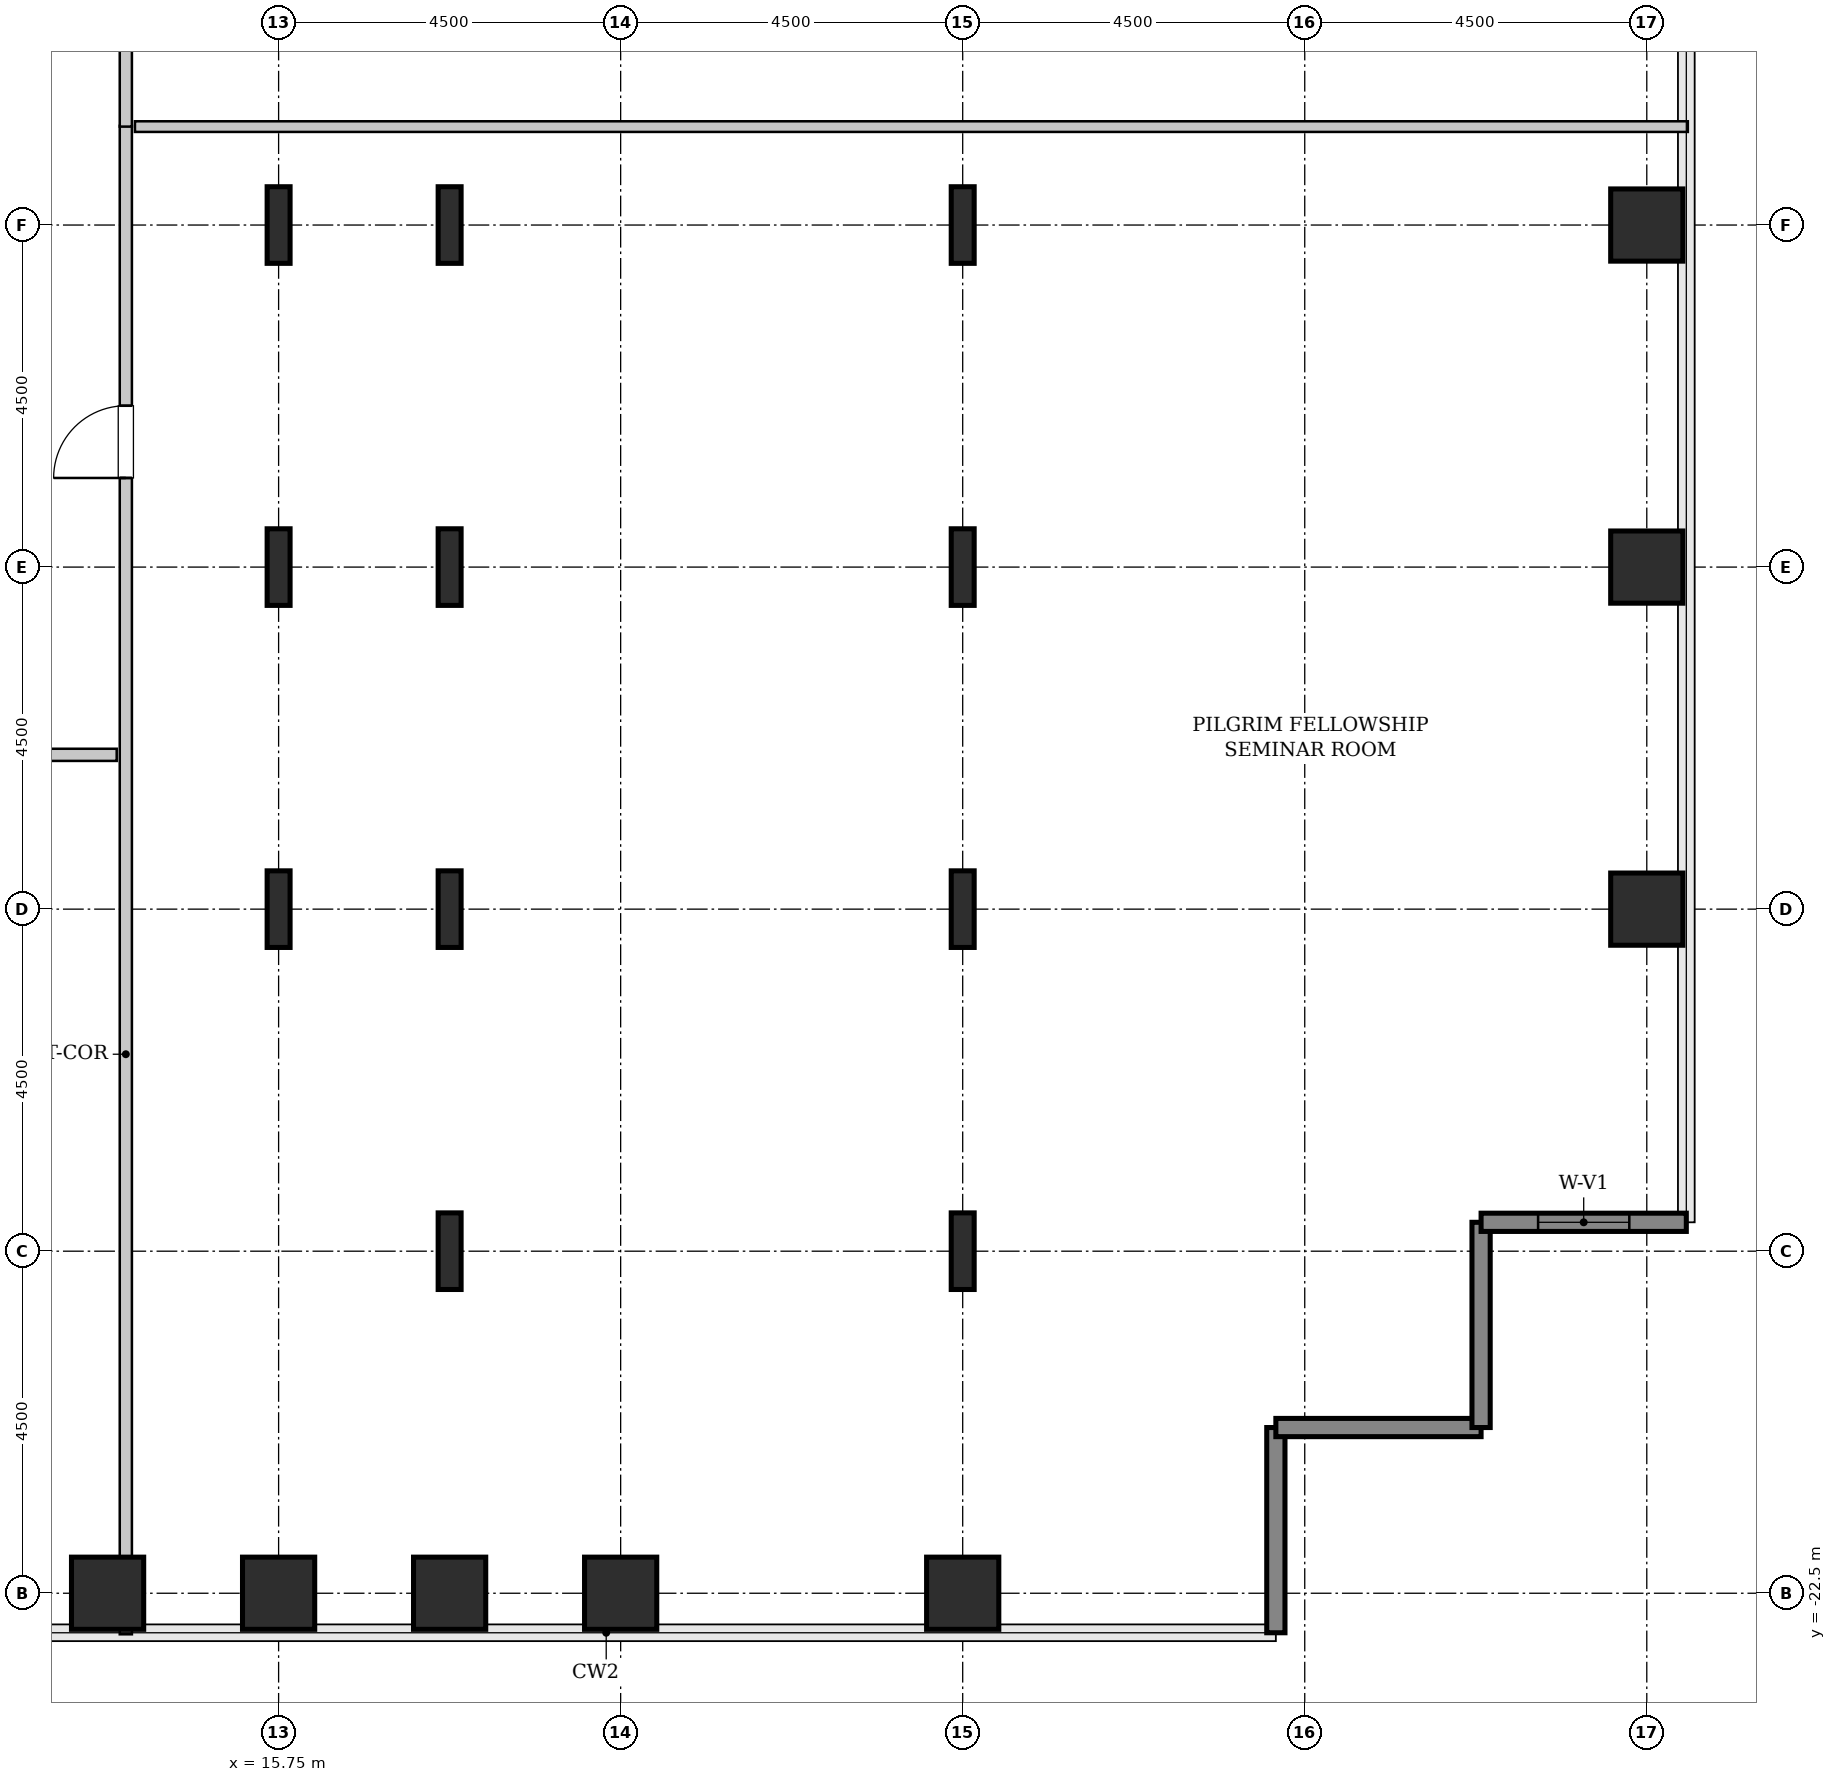
"""IFC4 building model, lengths in metres.
Left out: names, types, materials, properties, quantities, classifications, styles, units other than length and angle.
Written with IfcOpenShell. Run it as: python <this file> out.ifc"""

import sys

from ifc_helpers import new_model, si_unit, direction, frame, frame_2d, origin, origin_2d, place, context, subcontext, project, spatial, rectangle, hollow_rectangle, i_section, extrude, source, transform, mapped, element, fill, save


model = new_model("IFC4")
c1 = context("Model", 3, precision=1e-05, world=origin(), true_north=direction((0.0, 1.0)))
c2 = subcontext(c1, "Body", "Model", "MODEL_VIEW")
j1 = project(units=[si_unit("LENGTHUNIT", "METRE"), si_unit("PLANEANGLEUNIT", "RADIAN")], contexts=[c1])
p1 = place(None, origin())
s1 = spatial("IfcSite", under=j1, at=p1, CompositionType="ELEMENT")
p2 = place(p1, origin())
s2 = spatial("IfcBuilding", under=s1, at=p2, CompositionType="ELEMENT")
p3 = place(p2, frame((0.0, 0.0, 106.0)))
s3 = spatial("IfcBuildingStorey", under=s2, at=p3, CompositionType="ELEMENT", Elevation=106.0)
m1 = source(origin(), c2, "Body", "SweptSolid", [
    extrude(hollow_rectangle(XDim=0.95, YDim=0.95, WallThickness=0.045, InnerFilletRadius=0.045, OuterFilletRadius=0.09, at=origin_2d()), origin(), (0.0, 0.0, 1.0), 3.8),
])
for number, where, z_axis, x_axis in (
    (1, (13.5, -22.5, 0.0), (0.0, 0.0, 1.0), (1.0, 0.0, 0.0)),
    (2, (15.75, -22.5, 0.0), (0.0, 0.0, 1.0), (1.0, 0.0, 0.0)),
):
    element("IfcColumn", number, at=place(p3, frame(where, z_axis=z_axis, x_axis=x_axis)), inside=s3, PredefinedType="COLUMN", context=c2, shape_type="MappedRepresentation", body=[
        mapped(m1, transform((0.0, 0.0, 0.0), x_axis=(1.0, 0.0, 0.0), y_axis=(0.0, 1.0, 0.0), z_axis=(0.0, 0.0, 1.0), scale=1.0)),
    ])
m2 = source(origin(), c2, "Body", "SweptSolid", [
    extrude(i_section(OverallWidth=0.302, OverallDepth=1.008, WebThickness=0.021, FlangeThickness=0.04, FilletRadius=0.03, at=origin_2d()), origin(), (0.0, 0.0, 1.0), 3.8),
])
for number, where, z_axis, x_axis in (
    (3, (15.75, -13.5, 0.0), (0.0, 0.0, 1.0), (1.0, 0.0, 0.0)),
    (4, (15.75, -9.0, 0.0), (0.0, 0.0, 1.0), (1.0, 0.0, 0.0)),
    (5, (15.75, -4.5, 0.0), (0.0, 0.0, 1.0), (1.0, 0.0, 0.0)),
):
    element("IfcColumn", number, at=place(p3, frame(where, z_axis=z_axis, x_axis=x_axis)), inside=s3, PredefinedType="COLUMN", context=c2, shape_type="MappedRepresentation", body=[
        mapped(m2, transform((0.0, 0.0, 0.0), x_axis=(1.0, 0.0, 0.0), y_axis=(0.0, 1.0, 0.0), z_axis=(0.0, 0.0, 1.0), scale=1.0)),
    ])
p4 = place(p3, frame((18.0, -22.5, 0.0), z_axis=(0.0, 0.0, 1.0), x_axis=(1.0, 0.0, 0.0)))
e6 = element("IfcColumn", 6, at=p4, inside=s3, PredefinedType="COLUMN", context=c2, shape_type="MappedRepresentation", body=[
    mapped(m1, transform((0.0, 0.0, 0.0), x_axis=(1.0, 0.0, 0.0), y_axis=(0.0, 1.0, 0.0), z_axis=(0.0, 0.0, 1.0), scale=1.0)),
])
for number, where, z_axis, x_axis in (
    (7, (18.0, -18.0, 0.0), (0.0, 0.0, 1.0), (1.0, 0.0, 0.0)),
    (8, (18.0, -13.5, 0.0), (0.0, 0.0, 1.0), (1.0, 0.0, 0.0)),
    (9, (18.0, -9.0, 0.0), (0.0, 0.0, 1.0), (1.0, 0.0, 0.0)),
    (10, (18.0, -4.5, 0.0), (0.0, 0.0, 1.0), (1.0, 0.0, 0.0)),
):
    element("IfcColumn", number, at=place(p3, frame(where, z_axis=z_axis, x_axis=x_axis)), inside=s3, PredefinedType="COLUMN", context=c2, shape_type="MappedRepresentation", body=[
        mapped(m2, transform((0.0, 0.0, 0.0), x_axis=(1.0, 0.0, 0.0), y_axis=(0.0, 1.0, 0.0), z_axis=(0.0, 0.0, 1.0), scale=1.0)),
    ])
for number, where, z_axis, x_axis in (
    (11, (20.25, -22.5, 0.0), (0.0, 0.0, 1.0), (1.0, 0.0, 0.0)),
    (12, (24.75, -22.5, 0.0), (0.0, 0.0, 1.0), (1.0, 0.0, 0.0)),
):
    element("IfcColumn", number, at=place(p3, frame(where, z_axis=z_axis, x_axis=x_axis)), inside=s3, PredefinedType="COLUMN", context=c2, shape_type="MappedRepresentation", body=[
        mapped(m1, transform((0.0, 0.0, 0.0), x_axis=(1.0, 0.0, 0.0), y_axis=(0.0, 1.0, 0.0), z_axis=(0.0, 0.0, 1.0), scale=1.0)),
    ])
for number, where, z_axis, x_axis in (
    (13, (24.75, -18.0, 0.0), (0.0, 0.0, 1.0), (1.0, 0.0, 0.0)),
    (14, (24.75, -13.5, 0.0), (0.0, 0.0, 1.0), (1.0, 0.0, 0.0)),
    (15, (24.75, -9.0, 0.0), (0.0, 0.0, 1.0), (1.0, 0.0, 0.0)),
    (16, (24.75, -4.5, 0.0), (0.0, 0.0, 1.0), (1.0, 0.0, 0.0)),
):
    element("IfcColumn", number, at=place(p3, frame(where, z_axis=z_axis, x_axis=x_axis)), inside=s3, PredefinedType="COLUMN", context=c2, shape_type="MappedRepresentation", body=[
        mapped(m2, transform((0.0, 0.0, 0.0), x_axis=(1.0, 0.0, 0.0), y_axis=(0.0, 1.0, 0.0), z_axis=(0.0, 0.0, 1.0), scale=1.0)),
    ])
for number, where, z_axis, x_axis in (
    (17, (33.75, -13.5, 0.0), (0.0, 0.0, 1.0), (1.0, 0.0, 0.0)),
    (18, (33.75, -9.0, 0.0), (0.0, 0.0, 1.0), (1.0, 0.0, 0.0)),
    (19, (33.75, -4.5, 0.0), (0.0, 0.0, 1.0), (1.0, 0.0, 0.0)),
):
    element("IfcColumn", number, at=place(p3, frame(where, z_axis=z_axis, x_axis=x_axis)), inside=s3, PredefinedType="COLUMN", context=c2, shape_type="MappedRepresentation", body=[
        mapped(m1, transform((0.0, 0.0, 0.0), x_axis=(1.0, 0.0, 0.0), y_axis=(0.0, 1.0, 0.0), z_axis=(0.0, 0.0, 1.0), scale=1.0)),
    ])
m3 = source(origin(), c2, "Body", "SweptSolid", [
    extrude(rectangle(XDim=2.7, YDim=0.24, at=frame_2d((1.35, 0.0))), origin(), (0.0, 0.0, 1.0), 3.55),
])
for number, where, z_axis, x_axis in (
    (20, (28.87, -23.02, 0.0), (0.0, 0.0, 1.0), (0.0, 1.0, 0.0)),
    (21, (28.87, -20.32, 0.0), (0.0, 0.0, 1.0), (1.0, 0.0, 0.0)),
    (22, (31.57, -20.32, 0.0), (0.0, 0.0, 1.0), (0.0, 1.0, 0.0)),
):
    element("IfcWall", number, at=place(p3, frame(where, z_axis=z_axis, x_axis=x_axis)), inside=s3, PredefinedType="SHEAR", context=c2, shape_type="MappedRepresentation", body=[
        mapped(m3, transform((0.0, 0.0, 0.0), x_axis=(1.0, 0.0, 0.0), y_axis=(0.0, 1.0, 0.0), z_axis=(0.0, 0.0, 1.0), scale=1.0)),
    ])
p5 = place(p3, frame((31.57, -17.62, 0.0), z_axis=(0.0, 0.0, 1.0), x_axis=(1.0, 0.0, 0.0)))
e23 = element("IfcWall", 23, at=p5, inside=s3, PredefinedType="SHEAR", context=c2, shape_type="MappedRepresentation", body=[
    mapped(m3, transform((0.0, 0.0, 0.0), x_axis=(1.0, 0.0, 0.0), y_axis=(0.0, 1.0, 0.0), z_axis=(0.0, 0.0, 1.0), scale=1.0)),
])
p6 = place(p5, frame((0.75, 0.0, 0.85)))
e24 = element("IfcOpeningElement", 24, at=p6, cuts=e23, PredefinedType="OPENING", context=c2, shape_type="SweptSolid", body=[
    extrude(rectangle(XDim=1.2, YDim=1.8, at=frame_2d((0.6, 0.9))), frame((0.0, 0.13, 0.0), z_axis=(0.0, -1.0, 0.0), x_axis=(1.0, 0.0, 0.0)), (0.0, 0.0, 1.0), 0.26),
])
m4 = source(origin(), c2, "Body", "SweptSolid", [
    extrude(rectangle(XDim=19.845, YDim=0.16, at=frame_2d((9.922, 0.0))), origin(), (0.0, 0.0, 1.0), 3.535),
])
p7 = place(p3, frame((13.74, -23.04, 0.0), z_axis=(0.0, 0.0, 1.0), x_axis=(0.0, 1.0, 0.0)))
e25 = element("IfcWall", 25, at=p7, inside=s3, PredefinedType="PARTITIONING", context=c2, shape_type="MappedRepresentation", body=[
    mapped(m4, transform((0.0, 0.0, 0.0), x_axis=(1.0, 0.0, 0.0), y_axis=(0.0, 1.0, 0.0), z_axis=(0.0, 0.0, 1.0), scale=1.0)),
])
p8 = place(p7, frame((15.212, 0.0, 0.0)))
e26 = element("IfcOpeningElement", 26, at=p8, cuts=e25, PredefinedType="OPENING", context=c2, shape_type="SweptSolid", body=[
    extrude(rectangle(XDim=0.95, YDim=2.1, at=frame_2d((0.475, 1.05))), frame((0.0, 0.09, 0.0), z_axis=(0.0, -1.0, 0.0), x_axis=(1.0, 0.0, 0.0)), (0.0, 0.0, 1.0), 0.18),
])
m5 = source(origin(), c2, "Body", "SweptSolid", [
    extrude(rectangle(XDim=20.43, YDim=0.14, at=frame_2d((10.215, 0.0))), origin(), (0.0, 0.0, 1.0), 3.535),
])
p9 = place(p3, frame((13.86, -3.205, 0.0), z_axis=(0.0, 0.0, 1.0), x_axis=(1.0, 0.0, 0.0)))
e27 = element("IfcWall", 27, at=p9, inside=s3, PredefinedType="PARTITIONING", context=c2, shape_type="MappedRepresentation", body=[
    mapped(m5, transform((0.0, 0.0, 0.0), x_axis=(1.0, 0.0, 0.0), y_axis=(0.0, 1.0, 0.0), z_axis=(0.0, 0.0, 1.0), scale=1.0)),
])
m6 = source(origin(), c2, "Body", "SweptSolid", [
    extrude(rectangle(XDim=6.81, YDim=0.16, at=frame_2d((3.405, 0.0))), origin(), (0.0, 0.0, 1.0), 3.535),
])
p10 = place(p3, frame((13.74, -3.205, 0.0), z_axis=(0.0, 0.0, 1.0), x_axis=(0.0, 1.0, 0.0)))
e28 = element("IfcWall", 28, at=p10, inside=s3, PredefinedType="PARTITIONING", context=c2, shape_type="MappedRepresentation", body=[
    mapped(m6, transform((0.0, 0.0, 0.0), x_axis=(1.0, 0.0, 0.0), y_axis=(0.0, 1.0, 0.0), z_axis=(0.0, 0.0, 1.0), scale=1.0)),
])
p11 = place(p10, frame((2.93, 0.0, 0.0)))
e29 = element("IfcOpeningElement", 29, at=p11, cuts=e28, PredefinedType="OPENING", context=c2, shape_type="SweptSolid", body=[
    extrude(rectangle(XDim=0.95, YDim=2.1, at=frame_2d((0.475, 1.05))), frame((0.0, 0.09, 0.0), z_axis=(0.0, -1.0, 0.0), x_axis=(1.0, 0.0, 0.0)), (0.0, 0.0, 1.0), 0.18),
])
m7 = source(origin(), c2, "Body", "SweptSolid", [
    extrude(rectangle(XDim=4.66, YDim=0.16, at=frame_2d((2.33, 0.0))), origin(), (0.0, 0.0, 1.0), 3.535),
])
p12 = place(p3, frame((8.96, -11.47, 0.0), z_axis=(0.0, 0.0, 1.0), x_axis=(1.0, 0.0, 0.0)))
e30 = element("IfcWall", 30, at=p12, inside=s3, PredefinedType="PARTITIONING", context=c2, shape_type="MappedRepresentation", body=[
    mapped(m7, transform((0.0, 0.0, 0.0), x_axis=(1.0, 0.0, 0.0), y_axis=(0.0, 1.0, 0.0), z_axis=(0.0, 0.0, 1.0), scale=1.0)),
])
p13 = place(p12, frame((1.855, 0.0, 0.0)))
e31 = element("IfcOpeningElement", 31, at=p13, cuts=e30, PredefinedType="OPENING", context=c2, shape_type="SweptSolid", body=[
    extrude(rectangle(XDim=0.95, YDim=2.1, at=frame_2d((0.475, 1.05))), frame((0.0, 0.09, 0.0), z_axis=(0.0, -1.0, 0.0), x_axis=(1.0, 0.0, 0.0)), (0.0, 0.0, 1.0), 0.18),
])
m8 = source(origin(), c2, "Body", "SweptSolid", [
    extrude(rectangle(XDim=1.2, YDim=1.8, at=frame_2d((0.6, 0.9))), frame((0.0, 0.03, 0.0), z_axis=(0.0, -1.0, 0.0), x_axis=(1.0, 0.0, 0.0)), (0.0, 0.0, 1.0), 0.06),
])
p14 = place(p6, origin())
e32 = element("IfcWindow", 32, at=p14, inside=s3, PartitioningType="SINGLE_PANEL", PredefinedType="WINDOW", context=c2, shape_type="MappedRepresentation", body=[
    mapped(m8, transform((0.0, 0.0, 0.0), x_axis=(1.0, 0.0, 0.0), y_axis=(0.0, 1.0, 0.0), z_axis=(0.0, 0.0, 1.0), scale=1.0)),
])
fill(e24, e32)
m9 = source(origin(), c2, "Body", "SweptSolid", [
    extrude(rectangle(XDim=0.95, YDim=2.1, at=frame_2d((0.475, 1.05))), frame((0.0, 0.025, 0.0), z_axis=(0.0, -1.0, 0.0), x_axis=(1.0, 0.0, 0.0)), (0.0, 0.0, 1.0), 0.05),
])
p15 = place(p8, origin())
e33 = element("IfcDoor", 33, at=p15, inside=s3, OperationType="SINGLE_SWING_LEFT", PredefinedType="DOOR", context=c2, shape_type="MappedRepresentation", body=[
    mapped(m9, transform((0.0, 0.0, 0.0), x_axis=(1.0, 0.0, 0.0), y_axis=(0.0, 1.0, 0.0), z_axis=(0.0, 0.0, 1.0), scale=1.0)),
])
fill(e26, e33)
save(model, sys.argv[1])
